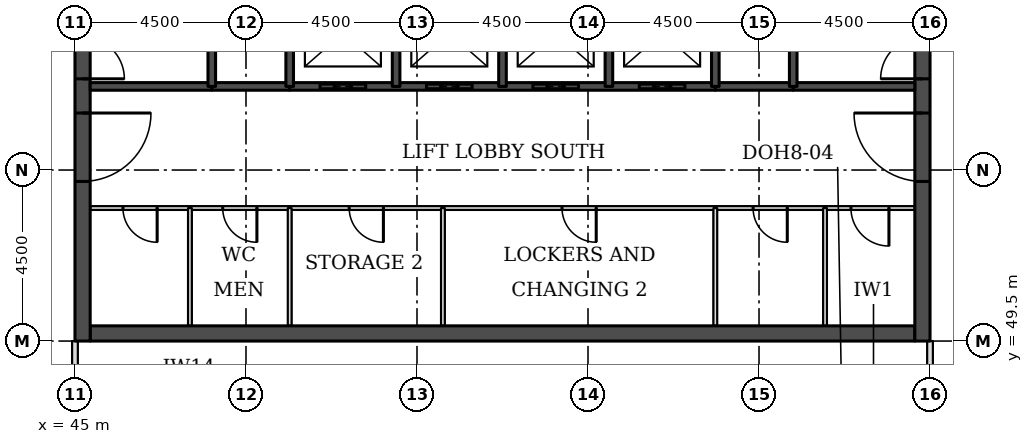
"""IFC4 building model, lengths in metres.
Left out: names, types, materials, properties, quantities, classifications, styles, units other than length and angle.
Written with IfcOpenShell. Run it as: python <this file> out.ifc"""

import sys

from ifc_helpers import new_model, si_unit, direction, frame, frame_2d, origin, place, context, subcontext, project, spatial, rectangle, extrude, element, fill, save


model = new_model("IFC4")
c1 = context("Model", 3, precision=1e-05, world=origin(), true_north=direction((0.0, 1.0)))
c2 = subcontext(c1, "Body", "Model", "MODEL_VIEW")
j1 = project(units=[si_unit("LENGTHUNIT", "METRE"), si_unit("PLANEANGLEUNIT", "RADIAN")], contexts=[c1])
p1 = place(None, origin())
s1 = spatial("IfcSite", under=j1, at=p1, CompositionType="ELEMENT")
p2 = place(p1, origin())
s2 = spatial("IfcBuilding", under=s1, at=p2, CompositionType="ELEMENT")
p3 = place(p2, frame((0.0, 0.0, 199.5)))
s3 = spatial("IfcBuildingStorey", under=s2, at=p3, CompositionType="ELEMENT", Elevation=199.5)
p4 = place(p3, frame((45.4, 49.7, 0.0), z_axis=(0.0, 0.0, 1.0), x_axis=(1.0, 0.0, 0.0)))
e1 = element("IfcWall", 1, at=p4, inside=s3, PredefinedType="SHEAR", context=c2, shape_type="SweptSolid", body=[
    extrude(rectangle(XDim=21.7, YDim=0.4, at=frame_2d((10.85, 0.0))), origin(), (0.0, 0.0, 1.0), 3.7),
])
p5 = place(p3, frame((45.2, 49.5, 0.0), z_axis=(0.0, 0.0, 1.0), x_axis=(0.0, 1.0, 0.0)))
e2 = element("IfcWall", 2, at=p5, inside=s3, PredefinedType="SHEAR", context=c2, shape_type="SweptSolid", body=[
    extrude(rectangle(XDim=22.5, YDim=0.4, at=frame_2d((11.25, 0.0))), origin(), (0.0, 0.0, 1.0), 3.7),
])
p6 = place(p5, frame((4.2, 0.0, 0.0)))
e3 = element("IfcOpeningElement", 3, at=p6, cuts=e2, PredefinedType="OPENING", context=c2, shape_type="SweptSolid", body=[
    extrude(rectangle(XDim=1.8, YDim=2.1, at=frame_2d((0.9, 1.05))), frame((0.0, 0.21, 0.0), z_axis=(0.0, -1.0, 0.0), x_axis=(1.0, 0.0, 0.0)), (0.0, 0.0, 1.0), 0.42),
])
p7 = place(p5, frame((6.9, 0.0, 0.0)))
e4 = element("IfcOpeningElement", 4, at=p7, cuts=e2, PredefinedType="OPENING", context=c2, shape_type="SweptSolid", body=[
    extrude(rectangle(XDim=1.1, YDim=2.1, at=frame_2d((0.55, 1.05))), frame((0.0, 0.21, 0.0), z_axis=(0.0, -1.0, 0.0), x_axis=(1.0, 0.0, 0.0)), (0.0, 0.0, 1.0), 0.42),
])
p8 = place(p5, frame((13.6, 0.0, 0.0)))
e5 = element("IfcOpeningElement", 5, at=p8, cuts=e2, PredefinedType="OPENING", context=c2, shape_type="SweptSolid", body=[
    extrude(rectangle(XDim=1.1, YDim=2.1, at=frame_2d((0.55, 1.05))), frame((0.0, 0.21, 0.0), z_axis=(0.0, -1.0, 0.0), x_axis=(1.0, 0.0, 0.0)), (0.0, 0.0, 1.0), 0.42),
])
p9 = place(p5, frame((16.5, 0.0, 0.0)))
e6 = element("IfcOpeningElement", 6, at=p9, cuts=e2, PredefinedType="OPENING", context=c2, shape_type="SweptSolid", body=[
    extrude(rectangle(XDim=1.8, YDim=2.1, at=frame_2d((0.9, 1.05))), frame((0.0, 0.21, 0.0), z_axis=(0.0, -1.0, 0.0), x_axis=(1.0, 0.0, 0.0)), (0.0, 0.0, 1.0), 0.42),
])
p10 = place(p3, frame((67.3, 49.5, 0.0), z_axis=(0.0, 0.0, 1.0), x_axis=(0.0, 1.0, 0.0)))
e7 = element("IfcWall", 7, at=p10, inside=s3, PredefinedType="SHEAR", context=c2, shape_type="SweptSolid", body=[
    extrude(rectangle(XDim=22.5, YDim=0.4, at=frame_2d((11.25, 0.0))), origin(), (0.0, 0.0, 1.0), 3.7),
])
p11 = place(p10, frame((4.2, 0.0, 0.0)))
e8 = element("IfcOpeningElement", 8, at=p11, cuts=e7, PredefinedType="OPENING", context=c2, shape_type="SweptSolid", body=[
    extrude(rectangle(XDim=1.8, YDim=2.1, at=frame_2d((0.9, 1.05))), frame((0.0, 0.21, 0.0), z_axis=(0.0, -1.0, 0.0), x_axis=(1.0, 0.0, 0.0)), (0.0, 0.0, 1.0), 0.42),
])
p12 = place(p10, frame((6.9, 0.0, 0.0)))
e9 = element("IfcOpeningElement", 9, at=p12, cuts=e7, PredefinedType="OPENING", context=c2, shape_type="SweptSolid", body=[
    extrude(rectangle(XDim=1.1, YDim=2.1, at=frame_2d((0.55, 1.05))), frame((0.0, 0.21, 0.0), z_axis=(0.0, -1.0, 0.0), x_axis=(1.0, 0.0, 0.0)), (0.0, 0.0, 1.0), 0.42),
])
p13 = place(p10, frame((13.6, 0.0, 0.0)))
e10 = element("IfcOpeningElement", 10, at=p13, cuts=e7, PredefinedType="OPENING", context=c2, shape_type="SweptSolid", body=[
    extrude(rectangle(XDim=1.1, YDim=2.1, at=frame_2d((0.55, 1.05))), frame((0.0, 0.21, 0.0), z_axis=(0.0, -1.0, 0.0), x_axis=(1.0, 0.0, 0.0)), (0.0, 0.0, 1.0), 0.42),
])
p14 = place(p10, frame((16.5, 0.0, 0.0)))
e11 = element("IfcOpeningElement", 11, at=p14, cuts=e7, PredefinedType="OPENING", context=c2, shape_type="SweptSolid", body=[
    extrude(rectangle(XDim=1.8, YDim=2.1, at=frame_2d((0.9, 1.05))), frame((0.0, 0.21, 0.0), z_axis=(0.0, -1.0, 0.0), x_axis=(1.0, 0.0, 0.0)), (0.0, 0.0, 1.0), 0.42),
])
p15 = place(p3, frame((67.5, 46.5, 0.0), z_axis=(0.0, 0.0, 1.0), x_axis=(0.0, 1.0, 0.0)))
e12 = element("IfcWall", 12, at=p15, inside=s3, PredefinedType="PARTITIONING", context=c2, shape_type="SweptSolid", body=[
    extrude(rectangle(XDim=3.0, YDim=0.15, at=frame_2d((1.5, 0.0))), origin(), (0.0, 0.0, 1.0), 3.022),
])
p16 = place(p3, frame((45.0, 48.0, 0.0), z_axis=(0.0, 0.0, 1.0), x_axis=(0.0, 1.0, 0.0)))
e13 = element("IfcWall", 13, at=p16, inside=s3, PredefinedType="PARTITIONING", context=c2, shape_type="SweptSolid", body=[
    extrude(rectangle(XDim=1.5, YDim=0.15, at=frame_2d((0.75, 0.0))), origin(), (0.0, 0.0, 1.0), 3.022),
])
p17 = place(p3, frame((45.4, 53.0, 0.0), z_axis=(0.0, 0.0, 1.0), x_axis=(1.0, 0.0, 0.0)))
e14 = element("IfcWall", 14, at=p17, inside=s3, PredefinedType="PARTITIONING", context=c2, shape_type="SweptSolid", body=[
    extrude(rectangle(XDim=21.7, YDim=0.1, at=frame_2d((10.85, 0.0))), origin(), (0.0, 0.0, 1.0), 3.55),
])
p18 = place(p17, frame((20.019, 0.0, 0.0)))
e15 = element("IfcOpeningElement", 15, at=p18, cuts=e14, PredefinedType="OPENING", context=c2, shape_type="SweptSolid", body=[
    extrude(rectangle(XDim=1.0, YDim=2.1, at=frame_2d((0.5, 1.05))), frame((0.0, 0.06, 0.0), z_axis=(0.0, -1.0, 0.0), x_axis=(1.0, 0.0, 0.0)), (0.0, 0.0, 1.0), 0.12),
])
p19 = place(p17, frame((17.444, 0.0, 0.0)))
e16 = element("IfcOpeningElement", 16, at=p19, cuts=e14, PredefinedType="OPENING", context=c2, shape_type="SweptSolid", body=[
    extrude(rectangle(XDim=0.9, YDim=2.1, at=frame_2d((0.45, 1.05))), frame((0.0, 0.06, 0.0), z_axis=(0.0, -1.0, 0.0), x_axis=(1.0, 0.0, 0.0)), (0.0, 0.0, 1.0), 0.12),
])
p20 = place(p17, frame((0.863, 0.0, 0.0)))
e17 = element("IfcOpeningElement", 17, at=p20, cuts=e14, PredefinedType="OPENING", context=c2, shape_type="SweptSolid", body=[
    extrude(rectangle(XDim=0.9, YDim=2.1, at=frame_2d((0.45, 1.05))), frame((0.0, 0.06, 0.0), z_axis=(0.0, -1.0, 0.0), x_axis=(1.0, 0.0, 0.0)), (0.0, 0.0, 1.0), 0.12),
])
p21 = place(p17, frame((3.488, 0.0, 0.0)))
e18 = element("IfcOpeningElement", 18, at=p21, cuts=e14, PredefinedType="OPENING", context=c2, shape_type="SweptSolid", body=[
    extrude(rectangle(XDim=0.9, YDim=2.1, at=frame_2d((0.45, 1.05))), frame((0.0, 0.06, 0.0), z_axis=(0.0, -1.0, 0.0), x_axis=(1.0, 0.0, 0.0)), (0.0, 0.0, 1.0), 0.12),
])
p22 = place(p17, frame((6.816, 0.0, 0.0)))
e19 = element("IfcOpeningElement", 19, at=p22, cuts=e14, PredefinedType="OPENING", context=c2, shape_type="SweptSolid", body=[
    extrude(rectangle(XDim=0.9, YDim=2.1, at=frame_2d((0.45, 1.05))), frame((0.0, 0.06, 0.0), z_axis=(0.0, -1.0, 0.0), x_axis=(1.0, 0.0, 0.0)), (0.0, 0.0, 1.0), 0.12),
])
p23 = place(p17, frame((12.416, 0.0, 0.0)))
e20 = element("IfcOpeningElement", 20, at=p23, cuts=e14, PredefinedType="OPENING", context=c2, shape_type="SweptSolid", body=[
    extrude(rectangle(XDim=0.9, YDim=2.1, at=frame_2d((0.45, 1.05))), frame((0.0, 0.06, 0.0), z_axis=(0.0, -1.0, 0.0), x_axis=(1.0, 0.0, 0.0)), (0.0, 0.0, 1.0), 0.12),
])
for number, where, z_axis, x_axis in (
    (21, (48.6, 56.2, 0.0), (0.0, 0.0, 1.0), (1.0, 0.0, 0.0)),
    (22, (61.85, 56.2, 0.0), (0.0, 0.0, 1.0), (1.0, 0.0, 0.0)),
):
    element("IfcWall", number, at=place(p3, frame(where, z_axis=z_axis, x_axis=x_axis)), inside=s3, PredefinedType="SOLIDWALL", context=c2, shape_type="SweptSolid", body=[
        extrude(rectangle(XDim=2.05, YDim=0.2, at=frame_2d((1.025, 0.0))), origin(), (0.0, 0.0, 1.0), 3.55),
    ])
p24 = place(p3, frame((45.4, 56.2, 0.0), z_axis=(0.0, 0.0, 1.0), x_axis=(1.0, 0.0, 0.0)))
e23 = element("IfcWall", 23, at=p24, inside=s3, PredefinedType="SOLIDWALL", context=c2, shape_type="SweptSolid", body=[
    extrude(rectangle(XDim=3.2, YDim=0.2, at=frame_2d((1.6, 0.0))), origin(), (0.0, 0.0, 1.0), 3.55),
])
p25 = place(p3, frame((50.65, 56.2, 0.0), z_axis=(0.0, 0.0, 1.0), x_axis=(1.0, 0.0, 0.0)))
e24 = element("IfcWall", 24, at=p25, inside=s3, PredefinedType="SOLIDWALL", context=c2, shape_type="SweptSolid", body=[
    extrude(rectangle(XDim=11.2, YDim=0.2, at=frame_2d((5.6, 0.0))), origin(), (0.0, 0.0, 1.0), 3.55),
])
p26 = place(p25, frame((0.8, 0.0, 0.0)))
e25 = element("IfcOpeningElement", 25, at=p26, cuts=e24, PredefinedType="OPENING", context=c2, shape_type="SweptSolid", body=[
    extrude(rectangle(XDim=1.2, YDim=2.1, at=frame_2d((0.6, 1.05))), frame((0.0, 0.11, 0.0), z_axis=(0.0, -1.0, 0.0), x_axis=(1.0, 0.0, 0.0)), (0.0, 0.0, 1.0), 0.22),
])
p27 = place(p25, frame((3.6, 0.0, 0.0)))
e26 = element("IfcOpeningElement", 26, at=p27, cuts=e24, PredefinedType="OPENING", context=c2, shape_type="SweptSolid", body=[
    extrude(rectangle(XDim=1.2, YDim=2.1, at=frame_2d((0.6, 1.05))), frame((0.0, 0.11, 0.0), z_axis=(0.0, -1.0, 0.0), x_axis=(1.0, 0.0, 0.0)), (0.0, 0.0, 1.0), 0.22),
])
p28 = place(p25, frame((6.4, 0.0, 0.0)))
e27 = element("IfcOpeningElement", 27, at=p28, cuts=e24, PredefinedType="OPENING", context=c2, shape_type="SweptSolid", body=[
    extrude(rectangle(XDim=1.2, YDim=2.1, at=frame_2d((0.6, 1.05))), frame((0.0, 0.11, 0.0), z_axis=(0.0, -1.0, 0.0), x_axis=(1.0, 0.0, 0.0)), (0.0, 0.0, 1.0), 0.22),
])
p29 = place(p25, frame((9.2, 0.0, 0.0)))
e28 = element("IfcOpeningElement", 28, at=p29, cuts=e24, PredefinedType="OPENING", context=c2, shape_type="SweptSolid", body=[
    extrude(rectangle(XDim=1.2, YDim=2.1, at=frame_2d((0.6, 1.05))), frame((0.0, 0.11, 0.0), z_axis=(0.0, -1.0, 0.0), x_axis=(1.0, 0.0, 0.0)), (0.0, 0.0, 1.0), 0.22),
])
p30 = place(p3, frame((63.9, 56.2, 0.0), z_axis=(0.0, 0.0, 1.0), x_axis=(1.0, 0.0, 0.0)))
e29 = element("IfcWall", 29, at=p30, inside=s3, PredefinedType="SOLIDWALL", context=c2, shape_type="SweptSolid", body=[
    extrude(rectangle(XDim=3.2, YDim=0.2, at=frame_2d((1.6, 0.0))), origin(), (0.0, 0.0, 1.0), 3.55),
])
p31 = place(p3, frame((48.025, 49.9, 0.0), z_axis=(0.0, 0.0, 1.0), x_axis=(0.0, 1.0, 0.0)))
e30 = element("IfcWall", 30, at=p31, inside=s3, PredefinedType="PARTITIONING", context=c2, shape_type="SweptSolid", body=[
    extrude(rectangle(XDim=3.1, YDim=0.1, at=frame_2d((1.55, 0.0))), origin(), (0.0, 0.0, 1.0), 3.55),
])
p32 = place(p3, frame((48.6, 56.2, 0.0), z_axis=(0.0, 0.0, 1.0), x_axis=(0.0, 1.0, 0.0)))
e31 = element("IfcWall", 31, at=p32, inside=s3, PredefinedType="SOLIDWALL", context=c2, shape_type="SweptSolid", body=[
    extrude(rectangle(XDim=5.8, YDim=0.2, at=frame_2d((2.9, 0.0))), origin(), (0.0, 0.0, 1.0), 3.55),
])
p33 = place(p3, frame((50.65, 49.9, 0.0), z_axis=(0.0, 0.0, 1.0), x_axis=(0.0, 1.0, 0.0)))
e32 = element("IfcWall", 32, at=p33, inside=s3, PredefinedType="PARTITIONING", context=c2, shape_type="SweptSolid", body=[
    extrude(rectangle(XDim=3.1, YDim=0.1, at=frame_2d((1.55, 0.0))), origin(), (0.0, 0.0, 1.0), 3.55),
])
for number, where, z_axis, x_axis in (
    (33, (50.65, 56.2, 0.0), (0.0, 0.0, 1.0), (0.0, 1.0, 0.0)),
    (34, (53.45, 56.2, 0.0), (0.0, 0.0, 1.0), (0.0, 1.0, 0.0)),
):
    element("IfcWall", number, at=place(p3, frame(where, z_axis=z_axis, x_axis=x_axis)), inside=s3, PredefinedType="SOLIDWALL", context=c2, shape_type="SweptSolid", body=[
        extrude(rectangle(XDim=2.8, YDim=0.2, at=frame_2d((1.4, 0.0))), origin(), (0.0, 0.0, 1.0), 3.55),
    ])
p34 = place(p3, frame((54.682, 49.9, 0.0), z_axis=(0.0, 0.0, 1.0), x_axis=(0.0, 1.0, 0.0)))
e35 = element("IfcWall", 35, at=p34, inside=s3, PredefinedType="PARTITIONING", context=c2, shape_type="SweptSolid", body=[
    extrude(rectangle(XDim=3.1, YDim=0.1, at=frame_2d((1.55, 0.0))), origin(), (0.0, 0.0, 1.0), 3.55),
])
for number, where, z_axis, x_axis in (
    (36, (56.25, 56.2, 0.0), (0.0, 0.0, 1.0), (0.0, 1.0, 0.0)),
    (37, (59.05, 56.2, 0.0), (0.0, 0.0, 1.0), (0.0, 1.0, 0.0)),
):
    element("IfcWall", number, at=place(p3, frame(where, z_axis=z_axis, x_axis=x_axis)), inside=s3, PredefinedType="SOLIDWALL", context=c2, shape_type="SweptSolid", body=[
        extrude(rectangle(XDim=2.8, YDim=0.2, at=frame_2d((1.4, 0.0))), origin(), (0.0, 0.0, 1.0), 3.55),
    ])
p35 = place(p3, frame((61.85, 49.9, 0.0), z_axis=(0.0, 0.0, 1.0), x_axis=(0.0, 1.0, 0.0)))
e38 = element("IfcWall", 38, at=p35, inside=s3, PredefinedType="PARTITIONING", context=c2, shape_type="SweptSolid", body=[
    extrude(rectangle(XDim=3.1, YDim=0.1, at=frame_2d((1.55, 0.0))), origin(), (0.0, 0.0, 1.0), 3.55),
])
p36 = place(p3, frame((61.85, 56.2, 0.0), z_axis=(0.0, 0.0, 1.0), x_axis=(0.0, 1.0, 0.0)))
e39 = element("IfcWall", 39, at=p36, inside=s3, PredefinedType="SOLIDWALL", context=c2, shape_type="SweptSolid", body=[
    extrude(rectangle(XDim=2.8, YDim=0.2, at=frame_2d((1.4, 0.0))), origin(), (0.0, 0.0, 1.0), 3.55),
])
p37 = place(p3, frame((63.9, 56.2, 0.0), z_axis=(0.0, 0.0, 1.0), x_axis=(0.0, 1.0, 0.0)))
e40 = element("IfcWall", 40, at=p37, inside=s3, PredefinedType="SOLIDWALL", context=c2, shape_type="SweptSolid", body=[
    extrude(rectangle(XDim=5.8, YDim=0.2, at=frame_2d((2.9, 0.0))), origin(), (0.0, 0.0, 1.0), 3.55),
])
p38 = place(p3, frame((64.738, 49.9, 0.0), z_axis=(0.0, 0.0, 1.0), x_axis=(0.0, 1.0, 0.0)))
e41 = element("IfcWall", 41, at=p38, inside=s3, PredefinedType="PARTITIONING", context=c2, shape_type="SweptSolid", body=[
    extrude(rectangle(XDim=3.1, YDim=0.1, at=frame_2d((1.55, 0.0))), origin(), (0.0, 0.0, 1.0), 3.55),
])
p39 = place(p26, origin())
e42 = element("IfcDoor", 42, at=p39, inside=s3, OperationType="DOUBLE_DOOR_SLIDING", PredefinedType="DOOR", context=c2, shape_type="SweptSolid", body=[
    extrude(rectangle(XDim=1.2, YDim=2.1, at=frame_2d((0.6, 1.05))), frame((0.0, 0.025, 0.0), z_axis=(0.0, -1.0, 0.0), x_axis=(1.0, 0.0, 0.0)), (0.0, 0.0, 1.0), 0.05),
])
fill(e25, e42)
p40 = place(p27, origin())
e43 = element("IfcDoor", 43, at=p40, inside=s3, OperationType="DOUBLE_DOOR_SLIDING", PredefinedType="DOOR", context=c2, shape_type="SweptSolid", body=[
    extrude(rectangle(XDim=1.2, YDim=2.1, at=frame_2d((0.6, 1.05))), frame((0.0, 0.025, 0.0), z_axis=(0.0, -1.0, 0.0), x_axis=(1.0, 0.0, 0.0)), (0.0, 0.0, 1.0), 0.05),
])
fill(e26, e43)
p41 = place(p28, origin())
e44 = element("IfcDoor", 44, at=p41, inside=s3, OperationType="DOUBLE_DOOR_SLIDING", PredefinedType="DOOR", context=c2, shape_type="SweptSolid", body=[
    extrude(rectangle(XDim=1.2, YDim=2.1, at=frame_2d((0.6, 1.05))), frame((0.0, 0.025, 0.0), z_axis=(0.0, -1.0, 0.0), x_axis=(1.0, 0.0, 0.0)), (0.0, 0.0, 1.0), 0.05),
])
fill(e27, e44)
p42 = place(p29, origin())
e45 = element("IfcDoor", 45, at=p42, inside=s3, OperationType="DOUBLE_DOOR_SLIDING", PredefinedType="DOOR", context=c2, shape_type="SweptSolid", body=[
    extrude(rectangle(XDim=1.2, YDim=2.1, at=frame_2d((0.6, 1.05))), frame((0.0, 0.025, 0.0), z_axis=(0.0, -1.0, 0.0), x_axis=(1.0, 0.0, 0.0)), (0.0, 0.0, 1.0), 0.05),
])
fill(e28, e45)
p43 = place(p6, frame((1.8, 0.0, 0.0), z_axis=(0.0, 0.0, 1.0), x_axis=(-1.0, 0.0, 0.0)))
e46 = element("IfcDoor", 46, at=p43, inside=s3, OperationType="SINGLE_SWING_LEFT", PredefinedType="DOOR", context=c2, shape_type="SweptSolid", body=[
    extrude(rectangle(XDim=1.8, YDim=2.1, at=frame_2d((0.9, 1.05))), frame((0.0, 0.025, 0.0), z_axis=(0.0, -1.0, 0.0), x_axis=(1.0, 0.0, 0.0)), (0.0, 0.0, 1.0), 0.05),
])
fill(e3, e46)
p44 = place(p7, frame((1.1, 0.0, 0.0), z_axis=(0.0, 0.0, 1.0), x_axis=(-1.0, 0.0, 0.0)))
e47 = element("IfcDoor", 47, at=p44, inside=s3, OperationType="SINGLE_SWING_RIGHT", PredefinedType="DOOR", context=c2, shape_type="SweptSolid", body=[
    extrude(rectangle(XDim=1.1, YDim=2.1, at=frame_2d((0.55, 1.05))), frame((0.0, 0.025, 0.0), z_axis=(0.0, -1.0, 0.0), x_axis=(1.0, 0.0, 0.0)), (0.0, 0.0, 1.0), 0.05),
])
fill(e4, e47)
p45 = place(p11, origin())
e48 = element("IfcDoor", 48, at=p45, inside=s3, OperationType="SINGLE_SWING_RIGHT", PredefinedType="DOOR", context=c2, shape_type="SweptSolid", body=[
    extrude(rectangle(XDim=1.8, YDim=2.1, at=frame_2d((0.9, 1.05))), frame((0.0, 0.025, 0.0), z_axis=(0.0, -1.0, 0.0), x_axis=(1.0, 0.0, 0.0)), (0.0, 0.0, 1.0), 0.05),
])
fill(e8, e48)
p46 = place(p12, origin())
e49 = element("IfcDoor", 49, at=p46, inside=s3, OperationType="SINGLE_SWING_LEFT", PredefinedType="DOOR", context=c2, shape_type="SweptSolid", body=[
    extrude(rectangle(XDim=1.1, YDim=2.1, at=frame_2d((0.55, 1.05))), frame((0.0, 0.025, 0.0), z_axis=(0.0, -1.0, 0.0), x_axis=(1.0, 0.0, 0.0)), (0.0, 0.0, 1.0), 0.05),
])
fill(e9, e49)
p47 = place(p18, frame((1.0, 0.0, 0.0), z_axis=(0.0, 0.0, 1.0), x_axis=(-1.0, 0.0, 0.0)))
e50 = element("IfcDoor", 50, at=p47, inside=s3, OperationType="SINGLE_SWING_LEFT", PredefinedType="DOOR", context=c2, shape_type="SweptSolid", body=[
    extrude(rectangle(XDim=1.0, YDim=2.1, at=frame_2d((0.5, 1.05))), frame((0.0, 0.025, 0.0), z_axis=(0.0, -1.0, 0.0), x_axis=(1.0, 0.0, 0.0)), (0.0, 0.0, 1.0), 0.05),
])
fill(e15, e50)
p48 = place(p19, frame((0.9, 0.0, 0.0), z_axis=(0.0, 0.0, 1.0), x_axis=(-1.0, 0.0, 0.0)))
e51 = element("IfcDoor", 51, at=p48, inside=s3, OperationType="SINGLE_SWING_LEFT", PredefinedType="DOOR", context=c2, shape_type="SweptSolid", body=[
    extrude(rectangle(XDim=0.9, YDim=2.1, at=frame_2d((0.45, 1.05))), frame((0.0, 0.025, 0.0), z_axis=(0.0, -1.0, 0.0), x_axis=(1.0, 0.0, 0.0)), (0.0, 0.0, 1.0), 0.05),
])
fill(e16, e51)
p49 = place(p20, frame((0.9, 0.0, 0.0), z_axis=(0.0, 0.0, 1.0), x_axis=(-1.0, 0.0, 0.0)))
e52 = element("IfcDoor", 52, at=p49, inside=s3, OperationType="SINGLE_SWING_LEFT", PredefinedType="DOOR", context=c2, shape_type="SweptSolid", body=[
    extrude(rectangle(XDim=0.9, YDim=2.1, at=frame_2d((0.45, 1.05))), frame((0.0, 0.025, 0.0), z_axis=(0.0, -1.0, 0.0), x_axis=(1.0, 0.0, 0.0)), (0.0, 0.0, 1.0), 0.05),
])
fill(e17, e52)
p50 = place(p21, frame((0.9, 0.0, 0.0), z_axis=(0.0, 0.0, 1.0), x_axis=(-1.0, 0.0, 0.0)))
e53 = element("IfcDoor", 53, at=p50, inside=s3, OperationType="SINGLE_SWING_LEFT", PredefinedType="DOOR", context=c2, shape_type="SweptSolid", body=[
    extrude(rectangle(XDim=0.9, YDim=2.1, at=frame_2d((0.45, 1.05))), frame((0.0, 0.025, 0.0), z_axis=(0.0, -1.0, 0.0), x_axis=(1.0, 0.0, 0.0)), (0.0, 0.0, 1.0), 0.05),
])
fill(e18, e53)
p51 = place(p22, frame((0.9, 0.0, 0.0), z_axis=(0.0, 0.0, 1.0), x_axis=(-1.0, 0.0, 0.0)))
e54 = element("IfcDoor", 54, at=p51, inside=s3, OperationType="SINGLE_SWING_LEFT", PredefinedType="DOOR", context=c2, shape_type="SweptSolid", body=[
    extrude(rectangle(XDim=0.9, YDim=2.1, at=frame_2d((0.45, 1.05))), frame((0.0, 0.025, 0.0), z_axis=(0.0, -1.0, 0.0), x_axis=(1.0, 0.0, 0.0)), (0.0, 0.0, 1.0), 0.05),
])
fill(e19, e54)
p52 = place(p23, frame((0.9, 0.0, 0.0), z_axis=(0.0, 0.0, 1.0), x_axis=(-1.0, 0.0, 0.0)))
e55 = element("IfcDoor", 55, at=p52, inside=s3, OperationType="SINGLE_SWING_LEFT", PredefinedType="DOOR", context=c2, shape_type="SweptSolid", body=[
    extrude(rectangle(XDim=0.9, YDim=2.1, at=frame_2d((0.45, 1.05))), frame((0.0, 0.025, 0.0), z_axis=(0.0, -1.0, 0.0), x_axis=(1.0, 0.0, 0.0)), (0.0, 0.0, 1.0), 0.05),
])
fill(e20, e55)
save(model, sys.argv[1])
